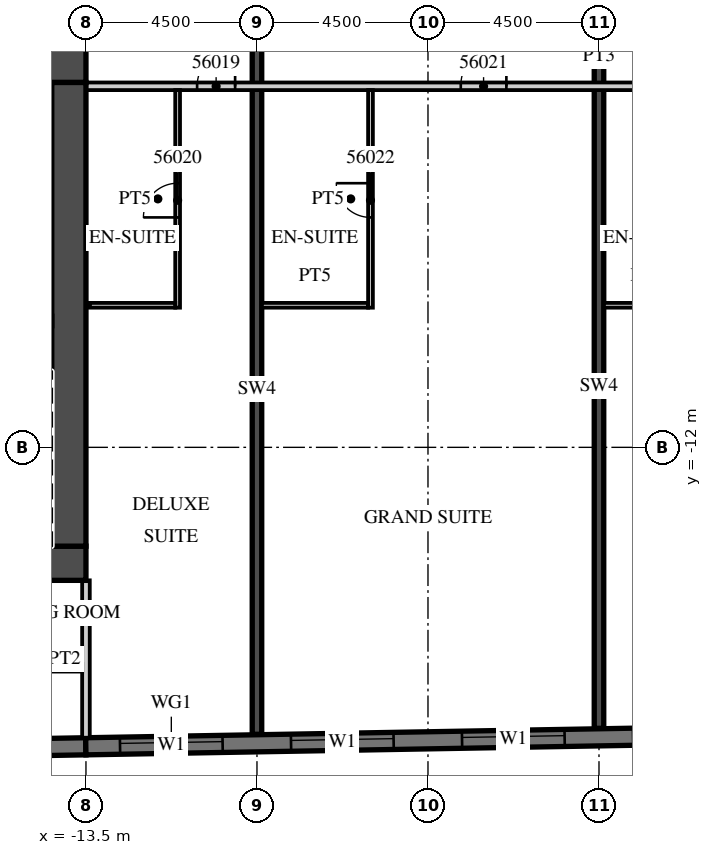
"""IFC4 building model, lengths in metres.
Left out: names, types, materials, properties, quantities, classifications, styles, units other than length and angle.
Written with IfcOpenShell. Run it as: python <this file> out.ifc"""

import sys

from ifc_helpers import new_model, si_unit, direction, frame, frame_2d, origin, place, context, subcontext, project, spatial, rectangle, extrude, element, fill, save


model = new_model("IFC4")
c1 = context("Model", 3, precision=1e-05, world=origin(), true_north=direction((0.0, 1.0)))
c2 = subcontext(c1, "Body", "Model", "MODEL_VIEW")
j1 = project(units=[si_unit("LENGTHUNIT", "METRE"), si_unit("PLANEANGLEUNIT", "RADIAN")], contexts=[c1])
p1 = place(None, origin())
s1 = spatial("IfcSite", under=j1, at=p1, CompositionType="ELEMENT")
p2 = place(p1, origin())
s2 = spatial("IfcBuilding", under=s1, at=p2, CompositionType="ELEMENT")
p3 = place(p2, frame((0.0, 0.0, 230.9)))
s3 = spatial("IfcBuildingStorey", under=s2, at=p3, CompositionType="ELEMENT", Elevation=230.9)
p4 = place(p3, frame((-9.0, -19.55, 0.0), z_axis=(0.0, 0.0, 1.0), x_axis=(0.0, 1.0, 0.0)))
e1 = element("IfcWall", 1, at=p4, inside=s3, PredefinedType="SHEAR", context=c2, shape_type="SweptSolid", body=[
    extrude(rectangle(XDim=18.15, YDim=0.25, at=frame_2d((9.075, 0.0))), origin(), (0.0, 0.0, 1.0), 3.3),
])
p5 = place(p3, frame((0.0, -19.393, 0.0), z_axis=(0.0, 0.0, 1.0), x_axis=(0.0, 1.0, 0.0)))
e2 = element("IfcWall", 2, at=p5, inside=s3, PredefinedType="SHEAR", context=c2, shape_type="SweptSolid", body=[
    extrude(rectangle(XDim=17.993, YDim=0.25, at=frame_2d((8.997, 0.0))), origin(), (0.0, 0.0, 1.0), 3.3),
])
p6 = place(p3, frame((-31.504, -20.18, 0.0), z_axis=(0.0, 0.0, 1.0), x_axis=(0.999847677887, 0.017453395744, 0.0)))
e3 = element("IfcWall", 3, at=p6, inside=s3, PredefinedType="SOLIDWALL", context=c2, shape_type="SweptSolid", body=[
    extrude(rectangle(XDim=18.003, YDim=0.45, at=frame_2d((9.001, 0.0))), origin(), (0.0, 0.0, 1.0), 3.02),
])
p7 = place(p3, frame((-13.504, -19.866, 0.0), z_axis=(0.0, 0.0, 1.0), x_axis=(0.999847672978, 0.017453676992, 0.0)))
e4 = element("IfcWall", 4, at=p7, inside=s3, PredefinedType="SOLIDWALL", context=c2, shape_type="SweptSolid", body=[
    extrude(rectangle(XDim=52.86, YDim=0.45, at=frame_2d((26.43, 0.0))), origin(), (0.0, 0.0, 1.0), 3.02),
])
p8 = place(p7, frame((0.9, 0.0, 0.45)))
e5 = element("IfcOpeningElement", 5, at=p8, cuts=e4, PredefinedType="OPENING", context=c2, shape_type="SweptSolid", body=[
    extrude(rectangle(XDim=2.7, YDim=2.25, at=frame_2d((1.35, 1.125))), frame((0.0, 0.235, 0.0), z_axis=(0.0, -1.0, 0.0), x_axis=(1.0, 0.0, 0.0)), (0.0, 0.0, 1.0), 0.47),
])
p9 = place(p7, frame((5.401, 0.0, 0.45)))
e6 = element("IfcOpeningElement", 6, at=p9, cuts=e4, PredefinedType="OPENING", context=c2, shape_type="SweptSolid", body=[
    extrude(rectangle(XDim=2.7, YDim=2.25, at=frame_2d((1.35, 1.125))), frame((0.0, 0.235, 0.0), z_axis=(0.0, -1.0, 0.0), x_axis=(1.0, 0.0, 0.0)), (0.0, 0.0, 1.0), 0.47),
])
p10 = place(p7, frame((9.902, 0.0, 0.45)))
e7 = element("IfcOpeningElement", 7, at=p10, cuts=e4, PredefinedType="OPENING", context=c2, shape_type="SweptSolid", body=[
    extrude(rectangle(XDim=2.7, YDim=2.25, at=frame_2d((1.35, 1.125))), frame((0.0, 0.235, 0.0), z_axis=(0.0, -1.0, 0.0), x_axis=(1.0, 0.0, 0.0)), (0.0, 0.0, 1.0), 0.47),
])
p11 = place(p7, frame((14.402, 0.0, 0.45)))
e8 = element("IfcOpeningElement", 8, at=p11, cuts=e4, PredefinedType="OPENING", context=c2, shape_type="SweptSolid", body=[
    extrude(rectangle(XDim=2.7, YDim=2.25, at=frame_2d((1.35, 1.125))), frame((0.0, 0.235, 0.0), z_axis=(0.0, -1.0, 0.0), x_axis=(1.0, 0.0, 0.0)), (0.0, 0.0, 1.0), 0.47),
])
p12 = place(p7, frame((18.903, 0.0, 0.45)))
e9 = element("IfcOpeningElement", 9, at=p12, cuts=e4, PredefinedType="OPENING", context=c2, shape_type="SweptSolid", body=[
    extrude(rectangle(XDim=2.7, YDim=2.25, at=frame_2d((1.35, 1.125))), frame((0.0, 0.235, 0.0), z_axis=(0.0, -1.0, 0.0), x_axis=(1.0, 0.0, 0.0)), (0.0, 0.0, 1.0), 0.47),
])
p13 = place(p7, frame((23.404, 0.0, 0.45)))
e10 = element("IfcOpeningElement", 10, at=p13, cuts=e4, PredefinedType="OPENING", context=c2, shape_type="SweptSolid", body=[
    extrude(rectangle(XDim=2.7, YDim=2.25, at=frame_2d((1.35, 1.125))), frame((0.0, 0.235, 0.0), z_axis=(0.0, -1.0, 0.0), x_axis=(1.0, 0.0, 0.0)), (0.0, 0.0, 1.0), 0.47),
])
p14 = place(p7, frame((27.904, 0.0, 0.45)))
e11 = element("IfcOpeningElement", 11, at=p14, cuts=e4, PredefinedType="OPENING", context=c2, shape_type="SweptSolid", body=[
    extrude(rectangle(XDim=2.7, YDim=2.25, at=frame_2d((1.35, 1.125))), frame((0.0, 0.235, 0.0), z_axis=(0.0, -1.0, 0.0), x_axis=(1.0, 0.0, 0.0)), (0.0, 0.0, 1.0), 0.47),
])
p15 = place(p7, frame((32.405, 0.0, 0.45)))
e12 = element("IfcOpeningElement", 12, at=p15, cuts=e4, PredefinedType="OPENING", context=c2, shape_type="SweptSolid", body=[
    extrude(rectangle(XDim=2.7, YDim=2.25, at=frame_2d((1.35, 1.125))), frame((0.0, 0.235, 0.0), z_axis=(0.0, -1.0, 0.0), x_axis=(1.0, 0.0, 0.0)), (0.0, 0.0, 1.0), 0.47),
])
p16 = place(p7, frame((36.906, 0.0, 0.45)))
e13 = element("IfcOpeningElement", 13, at=p16, cuts=e4, PredefinedType="OPENING", context=c2, shape_type="SweptSolid", body=[
    extrude(rectangle(XDim=2.7, YDim=2.25, at=frame_2d((1.35, 1.125))), frame((0.0, 0.235, 0.0), z_axis=(0.0, -1.0, 0.0), x_axis=(1.0, 0.0, 0.0)), (0.0, 0.0, 1.0), 0.47),
])
p17 = place(p7, frame((41.406, 0.0, 0.45)))
e14 = element("IfcOpeningElement", 14, at=p17, cuts=e4, PredefinedType="OPENING", context=c2, shape_type="SweptSolid", body=[
    extrude(rectangle(XDim=2.7, YDim=2.25, at=frame_2d((1.35, 1.125))), frame((0.0, 0.235, 0.0), z_axis=(0.0, -1.0, 0.0), x_axis=(1.0, 0.0, 0.0)), (0.0, 0.0, 1.0), 0.47),
])
p18 = place(p7, frame((45.907, 0.0, 0.45)))
e15 = element("IfcOpeningElement", 15, at=p18, cuts=e4, PredefinedType="OPENING", context=c2, shape_type="SweptSolid", body=[
    extrude(rectangle(XDim=2.7, YDim=2.25, at=frame_2d((1.35, 1.125))), frame((0.0, 0.235, 0.0), z_axis=(0.0, -1.0, 0.0), x_axis=(1.0, 0.0, 0.0)), (0.0, 0.0, 1.0), 0.47),
])
p19 = place(p3, frame((-13.5, -19.641, 0.0), z_axis=(0.0, 0.0, 1.0), x_axis=(0.0, 1.0, 0.0)))
e16 = element("IfcWall", 16, at=p19, inside=s3, PredefinedType="PARTITIONING", context=c2, shape_type="SweptSolid", body=[
    extrude(rectangle(XDim=4.141, YDim=0.2, at=frame_2d((2.071, 0.0))), origin(), (0.0, 0.0, 1.0), 3.02),
])
p20 = place(p3, frame((-13.5, -2.5, 0.0), z_axis=(0.0, 0.0, 1.0), x_axis=(1.0, 0.0, 0.0)))
e17 = element("IfcWall", 17, at=p20, inside=s3, PredefinedType="PARTITIONING", context=c2, shape_type="SweptSolid", body=[
    extrude(rectangle(XDim=27.0, YDim=0.2, at=frame_2d((13.5, 0.0))), origin(), (0.0, 0.0, 1.0), 3.02),
])
p21 = place(p20, frame((2.925, 0.0, 0.0)))
e18 = element("IfcOpeningElement", 18, at=p21, cuts=e17, PredefinedType="OPENING", context=c2, shape_type="SweptSolid", body=[
    extrude(rectangle(XDim=1.0, YDim=2.1, at=frame_2d((0.5, 1.05))), frame((0.0, 0.11, 0.0), z_axis=(0.0, -1.0, 0.0), x_axis=(1.0, 0.0, 0.0)), (0.0, 0.0, 1.0), 0.22),
])
p22 = place(p20, frame((9.863, 0.0, 0.0)))
e19 = element("IfcOpeningElement", 19, at=p22, cuts=e17, PredefinedType="OPENING", context=c2, shape_type="SweptSolid", body=[
    extrude(rectangle(XDim=1.2, YDim=2.1, at=frame_2d((0.6, 1.05))), frame((0.0, 0.11, 0.0), z_axis=(0.0, -1.0, 0.0), x_axis=(1.0, 0.0, 0.0)), (0.0, 0.0, 1.0), 0.22),
])
p23 = place(p20, frame((16.45, 0.0, 0.0)))
e20 = element("IfcOpeningElement", 20, at=p23, cuts=e17, PredefinedType="OPENING", context=c2, shape_type="SweptSolid", body=[
    extrude(rectangle(XDim=1.0, YDim=2.1, at=frame_2d((0.5, 1.05))), frame((0.0, 0.11, 0.0), z_axis=(0.0, -1.0, 0.0), x_axis=(1.0, 0.0, 0.0)), (0.0, 0.0, 1.0), 0.22),
])
p24 = place(p20, frame((20.925, 0.0, 0.0)))
e21 = element("IfcOpeningElement", 21, at=p24, cuts=e17, PredefinedType="OPENING", context=c2, shape_type="SweptSolid", body=[
    extrude(rectangle(XDim=1.0, YDim=2.1, at=frame_2d((0.5, 1.05))), frame((0.0, 0.11, 0.0), z_axis=(0.0, -1.0, 0.0), x_axis=(1.0, 0.0, 0.0)), (0.0, 0.0, 1.0), 0.22),
])
p25 = place(p20, frame((25.425, 0.0, 0.0)))
e22 = element("IfcOpeningElement", 22, at=p25, cuts=e17, PredefinedType="OPENING", context=c2, shape_type="SweptSolid", body=[
    extrude(rectangle(XDim=1.0, YDim=2.1, at=frame_2d((0.5, 1.05))), frame((0.0, 0.11, 0.0), z_axis=(0.0, -1.0, 0.0), x_axis=(1.0, 0.0, 0.0)), (0.0, 0.0, 1.0), 0.22),
])
p26 = place(p3, frame((-11.088, -8.325, 0.0), z_axis=(0.0, 0.0, 1.0), x_axis=(0.0, 1.0, 0.0)))
e23 = element("IfcWall", 23, at=p26, inside=s3, PredefinedType="PARTITIONING", context=c2, shape_type="SweptSolid", body=[
    extrude(rectangle(XDim=5.725, YDim=0.125, at=frame_2d((2.862, 0.0))), origin(), (0.0, 0.0, 1.0), 3.02),
])
p27 = place(p26, frame((2.375, 0.0, 0.0)))
e24 = element("IfcOpeningElement", 24, at=p27, cuts=e23, PredefinedType="OPENING", context=c2, shape_type="SweptSolid", body=[
    extrude(rectangle(XDim=0.9, YDim=2.1, at=frame_2d((0.45, 1.05))), frame((0.0, 0.073, 0.0), z_axis=(0.0, -1.0, 0.0), x_axis=(1.0, 0.0, 0.0)), (0.0, 0.0, 1.0), 0.145),
])
p28 = place(p3, frame((-13.4, -8.262, 0.0), z_axis=(0.0, 0.0, 1.0), x_axis=(1.0, 0.0, 0.0)))
e25 = element("IfcWall", 25, at=p28, inside=s3, PredefinedType="PARTITIONING", context=c2, shape_type="SweptSolid", body=[
    extrude(rectangle(XDim=2.25, YDim=0.125, at=frame_2d((1.125, 0.0))), origin(), (0.0, 0.0, 1.0), 3.02),
])
p29 = place(p3, frame((-6.013, -8.325, 0.0), z_axis=(0.0, 0.0, 1.0), x_axis=(0.0, 1.0, 0.0)))
e26 = element("IfcWall", 26, at=p29, inside=s3, PredefinedType="PARTITIONING", context=c2, shape_type="SweptSolid", body=[
    extrude(rectangle(XDim=5.725, YDim=0.125, at=frame_2d((2.862, 0.0))), origin(), (0.0, 0.0, 1.0), 3.02),
])
p30 = place(p29, frame((2.375, 0.0, 0.0)))
e27 = element("IfcOpeningElement", 27, at=p30, cuts=e26, PredefinedType="OPENING", context=c2, shape_type="SweptSolid", body=[
    extrude(rectangle(XDim=0.9, YDim=2.1, at=frame_2d((0.45, 1.05))), frame((0.0, 0.073, 0.0), z_axis=(0.0, -1.0, 0.0), x_axis=(1.0, 0.0, 0.0)), (0.0, 0.0, 1.0), 0.145),
])
p31 = place(p3, frame((-8.875, -8.262, 0.0), z_axis=(0.0, 0.0, 1.0), x_axis=(1.0, 0.0, 0.0)))
e28 = element("IfcWall", 28, at=p31, inside=s3, PredefinedType="PARTITIONING", context=c2, shape_type="SweptSolid", body=[
    extrude(rectangle(XDim=2.8, YDim=0.125, at=frame_2d((1.4, 0.0))), origin(), (0.0, 0.0, 1.0), 3.02),
])
p32 = place(p3, frame((0.125, -8.262, 0.0), z_axis=(0.0, 0.0, 1.0), x_axis=(1.0, 0.0, 0.0)))
e29 = element("IfcWall", 29, at=p32, inside=s3, PredefinedType="PARTITIONING", context=c2, shape_type="SweptSolid", body=[
    extrude(rectangle(XDim=2.25, YDim=0.125, at=frame_2d((1.125, 0.0))), origin(), (0.0, 0.0, 1.0), 3.02),
])
p33 = place(p3, frame((-31.5, -1.95, 0.0), z_axis=(0.0, 0.0, 1.0), x_axis=(1.0, 0.0, 0.0)))
e30 = element("IfcWall", 30, at=p33, inside=s3, PredefinedType="SHEAR", context=c2, shape_type="SweptSolid", body=[
    extrude(rectangle(XDim=18.0, YDim=0.9, at=frame_2d((9.0, 0.0))), origin(), (0.0, 0.0, 1.0), 3.02),
])
p34 = place(p33, frame((14.725, 0.0, 0.0)))
e31 = element("IfcOpeningElement", 31, at=p34, cuts=e30, PredefinedType="OPENING", context=c2, shape_type="SweptSolid", body=[
    extrude(rectangle(XDim=1.8, YDim=2.1, at=frame_2d((0.9, 1.05))), frame((0.0, 0.46, 0.0), z_axis=(0.0, -1.0, 0.0), x_axis=(1.0, 0.0, 0.0)), (0.0, 0.0, 1.0), 0.92),
])
p35 = place(p3, frame((-20.3, -15.05, 0.0), z_axis=(0.0, 0.0, 1.0), x_axis=(1.0, 0.0, 0.0)))
e32 = element("IfcWall", 32, at=p35, inside=s3, PredefinedType="SHEAR", context=c2, shape_type="SweptSolid", body=[
    extrude(rectangle(XDim=6.8, YDim=0.9, at=frame_2d((3.4, 0.0))), origin(), (0.0, 0.0, 1.0), 3.02),
])
p36 = place(p35, frame((0.875, 0.0, 0.0)))
e33 = element("IfcOpeningElement", 33, at=p36, cuts=e32, PredefinedType="OPENING", context=c2, shape_type="SweptSolid", body=[
    extrude(rectangle(XDim=1.2, YDim=2.1, at=frame_2d((0.6, 1.05))), frame((0.0, 0.46, 0.0), z_axis=(0.0, -1.0, 0.0), x_axis=(1.0, 0.0, 0.0)), (0.0, 0.0, 1.0), 0.92),
])
p37 = place(p3, frame((-13.95, -14.6, 0.0), z_axis=(0.0, 0.0, 1.0), x_axis=(0.0, 1.0, 0.0)))
e34 = element("IfcWall", 34, at=p37, inside=s3, PredefinedType="SHEAR", context=c2, shape_type="SweptSolid", body=[
    extrude(rectangle(XDim=12.2, YDim=0.9, at=frame_2d((6.1, 0.0))), origin(), (0.0, 0.0, 1.0), 3.02),
])
p38 = place(p3, frame((-35.864, -17.8, 0.0), z_axis=(0.0, 0.0, 1.0), x_axis=(1.0, 0.0, 0.0)))
e35 = element("IfcWall", 35, at=p38, inside=s3, PredefinedType="PARTITIONING", context=c2, shape_type="SweptSolid", body=[
    extrude(rectangle(XDim=22.264, YDim=0.2, at=frame_2d((11.132, 0.0))), origin(), (0.0, 0.0, 1.0), 3.02),
])
p39 = place(p38, frame((3.551, 0.0, 0.0)))
e36 = element("IfcOpeningElement", 36, at=p39, cuts=e35, PredefinedType="OPENING", context=c2, shape_type="SweptSolid", body=[
    extrude(rectangle(XDim=0.9, YDim=2.1, at=frame_2d((0.45, 1.05))), frame((0.0, 0.11, 0.0), z_axis=(0.0, -1.0, 0.0), x_axis=(1.0, 0.0, 0.0)), (0.0, 0.0, 1.0), 0.22),
])
p40 = place(p38, frame((11.851, 0.0, 0.0)))
e37 = element("IfcOpeningElement", 37, at=p40, cuts=e35, PredefinedType="OPENING", context=c2, shape_type="SweptSolid", body=[
    extrude(rectangle(XDim=0.9, YDim=2.1, at=frame_2d((0.45, 1.05))), frame((0.0, 0.11, 0.0), z_axis=(0.0, -1.0, 0.0), x_axis=(1.0, 0.0, 0.0)), (0.0, 0.0, 1.0), 0.22),
])
p41 = place(p8, origin())
e38 = element("IfcWindow", 38, at=p41, inside=s3, PartitioningType="SINGLE_PANEL", PredefinedType="WINDOW", context=c2, shape_type="SweptSolid", body=[
    extrude(rectangle(XDim=2.7, YDim=2.25, at=frame_2d((1.35, 1.125))), frame((0.0, 0.09, 0.0), z_axis=(0.0, -1.0, 0.0), x_axis=(1.0, 0.0, 0.0)), (0.0, 0.0, 1.0), 0.06),
])
fill(e5, e38)
p42 = place(p9, origin())
e39 = element("IfcWindow", 39, at=p42, inside=s3, PartitioningType="SINGLE_PANEL", PredefinedType="WINDOW", context=c2, shape_type="SweptSolid", body=[
    extrude(rectangle(XDim=2.7, YDim=2.25, at=frame_2d((1.35, 1.125))), frame((0.0, 0.09, 0.0), z_axis=(0.0, -1.0, 0.0), x_axis=(1.0, 0.0, 0.0)), (0.0, 0.0, 1.0), 0.06),
])
fill(e6, e39)
p43 = place(p10, origin())
e40 = element("IfcWindow", 40, at=p43, inside=s3, PartitioningType="SINGLE_PANEL", PredefinedType="WINDOW", context=c2, shape_type="SweptSolid", body=[
    extrude(rectangle(XDim=2.7, YDim=2.25, at=frame_2d((1.35, 1.125))), frame((0.0, 0.09, 0.0), z_axis=(0.0, -1.0, 0.0), x_axis=(1.0, 0.0, 0.0)), (0.0, 0.0, 1.0), 0.06),
])
fill(e7, e40)
p44 = place(p21, origin())
e41 = element("IfcDoor", 41, at=p44, inside=s3, OperationType="SINGLE_SWING_RIGHT", PredefinedType="DOOR", context=c2, shape_type="SweptSolid", body=[
    extrude(rectangle(XDim=1.0, YDim=2.1, at=frame_2d((0.5, 1.05))), frame((0.0, 0.025, 0.0), z_axis=(0.0, -1.0, 0.0), x_axis=(1.0, 0.0, 0.0)), (0.0, 0.0, 1.0), 0.05),
])
fill(e18, e41)
p45 = place(p27, origin())
e42 = element("IfcDoor", 42, at=p45, inside=s3, OperationType="SINGLE_SWING_LEFT", PredefinedType="DOOR", context=c2, shape_type="SweptSolid", body=[
    extrude(rectangle(XDim=0.9, YDim=2.1, at=frame_2d((0.45, 1.05))), frame((0.0, 0.025, 0.0), z_axis=(0.0, -1.0, 0.0), x_axis=(1.0, 0.0, 0.0)), (0.0, 0.0, 1.0), 0.05),
])
fill(e24, e42)
p46 = place(p22, origin())
e43 = element("IfcDoor", 43, at=p46, inside=s3, OperationType="SINGLE_SWING_RIGHT", PredefinedType="DOOR", context=c2, shape_type="SweptSolid", body=[
    extrude(rectangle(XDim=1.2, YDim=2.1, at=frame_2d((0.6, 1.05))), frame((0.0, 0.025, 0.0), z_axis=(0.0, -1.0, 0.0), x_axis=(1.0, 0.0, 0.0)), (0.0, 0.0, 1.0), 0.05),
])
fill(e19, e43)
p47 = place(p30, origin())
e44 = element("IfcDoor", 44, at=p47, inside=s3, OperationType="SINGLE_SWING_RIGHT", PredefinedType="DOOR", context=c2, shape_type="SweptSolid", body=[
    extrude(rectangle(XDim=0.9, YDim=2.1, at=frame_2d((0.45, 1.05))), frame((0.0, 0.025, 0.0), z_axis=(0.0, -1.0, 0.0), x_axis=(1.0, 0.0, 0.0)), (0.0, 0.0, 1.0), 0.05),
])
fill(e27, e44)
save(model, sys.argv[1])
